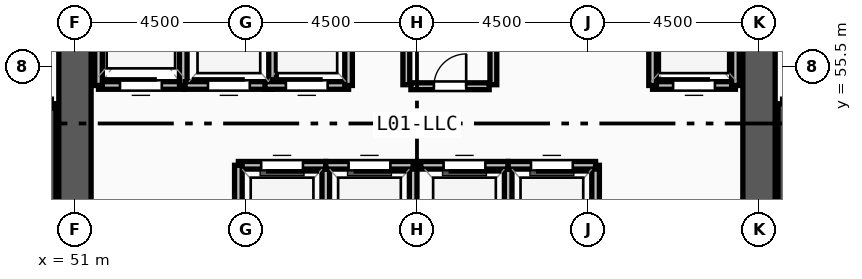
"""IFC4 building model, lengths in metres.
Left out: names, types, materials, properties, quantities, classifications, styles, units other than length and angle.
Written with IfcOpenShell. Run it as: python <this file> out.ifc"""

import sys

from ifc_helpers import new_model, si_unit, direction, frame, frame_2d, origin, place, context, subcontext, project, spatial, rectangle, extrude, source, transform, mapped, element, fill, save


model = new_model("IFC4")
c1 = context("Model", 3, precision=1e-05, world=origin(), true_north=direction((0.0, 1.0)))
c2 = subcontext(c1, "Body", "Model", "MODEL_VIEW")
j1 = project(units=[si_unit("LENGTHUNIT", "METRE"), si_unit("PLANEANGLEUNIT", "RADIAN")], contexts=[c1])
p1 = place(None, origin())
s1 = spatial("IfcSite", under=j1, at=p1, CompositionType="ELEMENT")
p2 = place(p1, origin())
s2 = spatial("IfcBuilding", under=s1, at=p2, CompositionType="ELEMENT")
p3 = place(p2, origin())
s3 = spatial("IfcBuildingStorey", under=s2, at=p3, CompositionType="ELEMENT", Elevation=0.0)
p4 = place(p3, frame((69.0, 60.6, 0.0), z_axis=(0.0, 0.0, 1.0), x_axis=(0.0, -1.0, 0.0)))
e1 = element("IfcWall", 1, at=p4, inside=s3, PredefinedType="SHEAR", context=c2, shape_type="SweptSolid", body=[
    extrude(rectangle(XDim=13.2, YDim=0.85, at=frame_2d((6.6, 0.0))), origin(), (0.0, 0.0, 1.0), 5.15),
])
m1 = source(origin(), c2, "Body", "SweptSolid", [
    extrude(rectangle(XDim=1.2, YDim=2.2, at=frame_2d((0.6, 1.1))), frame((0.0, 0.435, 0.0), z_axis=(0.0, -1.0, 0.0), x_axis=(1.0, 0.0, 0.0)), (0.0, 0.0, 1.0), 0.87),
])
p5 = place(p4, frame((1.05, 0.0, 0.0)))
e2 = element("IfcOpeningElement", 2, at=p5, cuts=e1, PredefinedType="OPENING", context=c2, shape_type="MappedRepresentation", body=[
    mapped(m1, transform((0.0, 0.0, 0.0), x_axis=(1.0, 0.0, 0.0), y_axis=(0.0, 1.0, 0.0), z_axis=(0.0, 0.0, 1.0), scale=1.0)),
])
p6 = place(p3, frame((51.0, 47.4, 0.0), z_axis=(0.0, 0.0, 1.0), x_axis=(0.0, 1.0, 0.0)))
e3 = element("IfcWall", 3, at=p6, inside=s3, PredefinedType="SHEAR", context=c2, shape_type="SweptSolid", body=[
    extrude(rectangle(XDim=13.2, YDim=0.85, at=frame_2d((6.6, 0.0))), origin(), (0.0, 0.0, 1.0), 5.15),
])
m2 = source(origin(), c2, "Body", "SweptSolid", [
    extrude(rectangle(XDim=1.1, YDim=2.2, at=frame_2d((0.55, 1.1))), frame((0.0, 0.435, 0.0), z_axis=(0.0, -1.0, 0.0), x_axis=(1.0, 0.0, 0.0)), (0.0, 0.0, 1.0), 0.87),
])
p7 = place(p6, frame((11.5, 0.0, 0.0)))
e4 = element("IfcOpeningElement", 4, at=p7, cuts=e3, PredefinedType="OPENING", context=c2, shape_type="MappedRepresentation", body=[
    mapped(m2, transform((0.0, 0.0, 0.0), x_axis=(1.0, 0.0, 0.0), y_axis=(0.0, 1.0, 0.0), z_axis=(0.0, 0.0, 1.0), scale=1.0)),
])
for number, where, z_axis, x_axis in (
    (5, (50.38, 46.7, 0.0), (0.0, 0.0, 1.0), (0.0, 1.0, 0.0)),
    (6, (69.62, 54.52, 0.0), (0.0, 0.0, 1.0), (0.0, -1.0, 0.0)),
):
    element("IfcWall", number, at=place(p3, frame(where, z_axis=z_axis, x_axis=x_axis)), inside=s3, PredefinedType="SOLIDWALL", context=c2, shape_type="SweptSolid", body=[
        extrude(rectangle(XDim=7.82, YDim=0.24, at=frame_2d((3.91, 0.0))), origin(), (0.0, 0.0, 1.0), 5.15),
    ])
p8 = place(p3, frame((51.62, 55.0, 0.0), z_axis=(0.0, 0.0, 1.0), x_axis=(1.0, 0.0, 0.0)))
e7 = element("IfcWall", 7, at=p8, inside=s3, PredefinedType="SOLIDWALL", context=c2, shape_type="SweptSolid", body=[
    extrude(rectangle(XDim=2.23, YDim=0.2, at=frame_2d((1.115, 0.0))), origin(), (0.0, 0.0, 1.0), 5.15),
])
m3 = source(origin(), c2, "Body", "SweptSolid", [
    extrude(rectangle(XDim=1.1, YDim=2.2, at=frame_2d((0.55, 1.1))), frame((0.0, 0.11, 0.0), z_axis=(0.0, -1.0, 0.0), x_axis=(1.0, 0.0, 0.0)), (0.0, 0.0, 1.0), 0.22),
])
p9 = place(p8, frame((0.565, 0.0, 0.0)))
e8 = element("IfcOpeningElement", 8, at=p9, cuts=e7, PredefinedType="OPENING", context=c2, shape_type="MappedRepresentation", body=[
    mapped(m3, transform((0.0, 0.0, 0.0), x_axis=(1.0, 0.0, 0.0), y_axis=(0.0, 1.0, 0.0), z_axis=(0.0, 0.0, 1.0), scale=1.0)),
])
for number, where, z_axis, x_axis in (
    (9, (53.85, 55.0, 0.0), (0.0, 0.0, 1.0), (0.0, 1.0, 0.0)),
    (10, (51.62, 58.0, 0.0), (0.0, 0.0, 1.0), (0.0, -1.0, 0.0)),
):
    element("IfcWall", number, at=place(p3, frame(where, z_axis=z_axis, x_axis=x_axis)), inside=s3, PredefinedType="SOLIDWALL", context=c2, shape_type="SweptSolid", body=[
        extrude(rectangle(XDim=3.0, YDim=0.2, at=frame_2d((1.5, 0.0))), origin(), (0.0, 0.0, 1.0), 5.15),
    ])
p10 = place(p3, frame((66.2, 55.0, 0.0), z_axis=(0.0, 0.0, 1.0), x_axis=(1.0, 0.0, 0.0)))
e11 = element("IfcWall", 11, at=p10, inside=s3, PredefinedType="SOLIDWALL", context=c2, shape_type="SweptSolid", body=[
    extrude(rectangle(XDim=2.18, YDim=0.2, at=frame_2d((1.09, 0.0))), origin(), (0.0, 0.0, 1.0), 5.15),
])
p11 = place(p10, frame((0.54, 0.0, 0.0)))
e12 = element("IfcOpeningElement", 12, at=p11, cuts=e11, PredefinedType="OPENING", context=c2, shape_type="MappedRepresentation", body=[
    mapped(m3, transform((0.0, 0.0, 0.0), x_axis=(1.0, 0.0, 0.0), y_axis=(0.0, 1.0, 0.0), z_axis=(0.0, 0.0, 1.0), scale=1.0)),
])
for number, where, z_axis, x_axis in (
    (13, (68.38, 55.0, 0.0), (0.0, 0.0, 1.0), (0.0, 1.0, 0.0)),
    (14, (66.2, 57.75, 0.0), (0.0, 0.0, 1.0), (0.0, -1.0, 0.0)),
):
    element("IfcWall", number, at=place(p3, frame(where, z_axis=z_axis, x_axis=x_axis)), inside=s3, PredefinedType="SOLIDWALL", context=c2, shape_type="SweptSolid", body=[
        extrude(rectangle(XDim=2.75, YDim=0.2, at=frame_2d((1.375, 0.0))), origin(), (0.0, 0.0, 1.0), 5.15),
    ])
p12 = place(p3, frame((57.6, 50.3, 0.0), z_axis=(0.0, 0.0, 1.0), x_axis=(0.0, 1.0, 0.0)))
e15 = element("IfcWall", 15, at=p12, inside=s3, PredefinedType="SOLIDWALL", context=c2, shape_type="SweptSolid", body=[
    extrude(rectangle(XDim=2.6, YDim=0.2, at=frame_2d((1.3, 0.0))), origin(), (0.0, 0.0, 1.0), 5.15),
])
p13 = place(p3, frame((57.6, 52.9, 0.0), z_axis=(0.0, 0.0, 1.0), x_axis=(-1.0, 0.0, 0.0)))
e16 = element("IfcWall", 16, at=p13, inside=s3, PredefinedType="SOLIDWALL", context=c2, shape_type="SweptSolid", body=[
    extrude(rectangle(XDim=2.3, YDim=0.2, at=frame_2d((1.15, 0.0))), origin(), (0.0, 0.0, 1.0), 5.15),
])
p14 = place(p13, frame((0.6, 0.0, 0.0)))
e17 = element("IfcOpeningElement", 17, at=p14, cuts=e16, PredefinedType="OPENING", context=c2, shape_type="MappedRepresentation", body=[
    mapped(m3, transform((0.0, 0.0, 0.0), x_axis=(1.0, 0.0, 0.0), y_axis=(0.0, 1.0, 0.0), z_axis=(0.0, 0.0, 1.0), scale=1.0)),
])
for number, where, z_axis, x_axis in (
    (18, (55.3, 52.9, 0.0), (0.0, 0.0, 1.0), (0.0, -1.0, 0.0)),
    (19, (59.9, 50.3, 0.0), (0.0, 0.0, 1.0), (0.0, 1.0, 0.0)),
):
    element("IfcWall", number, at=place(p3, frame(where, z_axis=z_axis, x_axis=x_axis)), inside=s3, PredefinedType="SOLIDWALL", context=c2, shape_type="SweptSolid", body=[
        extrude(rectangle(XDim=2.6, YDim=0.2, at=frame_2d((1.3, 0.0))), origin(), (0.0, 0.0, 1.0), 5.15),
    ])
p15 = place(p3, frame((59.9, 52.9, 0.0), z_axis=(0.0, 0.0, 1.0), x_axis=(-1.0, 0.0, 0.0)))
e20 = element("IfcWall", 20, at=p15, inside=s3, PredefinedType="SOLIDWALL", context=c2, shape_type="SweptSolid", body=[
    extrude(rectangle(XDim=2.3, YDim=0.2, at=frame_2d((1.15, 0.0))), origin(), (0.0, 0.0, 1.0), 5.15),
])
p16 = place(p15, frame((0.6, 0.0, 0.0)))
e21 = element("IfcOpeningElement", 21, at=p16, cuts=e20, PredefinedType="OPENING", context=c2, shape_type="MappedRepresentation", body=[
    mapped(m3, transform((0.0, 0.0, 0.0), x_axis=(1.0, 0.0, 0.0), y_axis=(0.0, 1.0, 0.0), z_axis=(0.0, 0.0, 1.0), scale=1.0)),
])
p17 = place(p3, frame((62.4, 50.3, 0.0), z_axis=(0.0, 0.0, 1.0), x_axis=(0.0, 1.0, 0.0)))
e22 = element("IfcWall", 22, at=p17, inside=s3, PredefinedType="SOLIDWALL", context=c2, shape_type="SweptSolid", body=[
    extrude(rectangle(XDim=2.6, YDim=0.2, at=frame_2d((1.3, 0.0))), origin(), (0.0, 0.0, 1.0), 5.15),
])
p18 = place(p3, frame((62.4, 52.9, 0.0), z_axis=(0.0, 0.0, 1.0), x_axis=(-1.0, 0.0, 0.0)))
e23 = element("IfcWall", 23, at=p18, inside=s3, PredefinedType="SOLIDWALL", context=c2, shape_type="SweptSolid", body=[
    extrude(rectangle(XDim=2.3, YDim=0.2, at=frame_2d((1.15, 0.0))), origin(), (0.0, 0.0, 1.0), 5.15),
])
p19 = place(p18, frame((0.6, 0.0, 0.0)))
e24 = element("IfcOpeningElement", 24, at=p19, cuts=e23, PredefinedType="OPENING", context=c2, shape_type="MappedRepresentation", body=[
    mapped(m3, transform((0.0, 0.0, 0.0), x_axis=(1.0, 0.0, 0.0), y_axis=(0.0, 1.0, 0.0), z_axis=(0.0, 0.0, 1.0), scale=1.0)),
])
p20 = place(p3, frame((64.7, 50.3, 0.0), z_axis=(0.0, 0.0, 1.0), x_axis=(0.0, 1.0, 0.0)))
e25 = element("IfcWall", 25, at=p20, inside=s3, PredefinedType="SOLIDWALL", context=c2, shape_type="SweptSolid", body=[
    extrude(rectangle(XDim=2.6, YDim=0.2, at=frame_2d((1.3, 0.0))), origin(), (0.0, 0.0, 1.0), 5.15),
])
p21 = place(p3, frame((64.7, 52.9, 0.0), z_axis=(0.0, 0.0, 1.0), x_axis=(-1.0, 0.0, 0.0)))
e26 = element("IfcWall", 26, at=p21, inside=s3, PredefinedType="SOLIDWALL", context=c2, shape_type="SweptSolid", body=[
    extrude(rectangle(XDim=2.3, YDim=0.2, at=frame_2d((1.15, 0.0))), origin(), (0.0, 0.0, 1.0), 5.15),
])
p22 = place(p21, frame((0.6, 0.0, 0.0)))
e27 = element("IfcOpeningElement", 27, at=p22, cuts=e26, PredefinedType="OPENING", context=c2, shape_type="MappedRepresentation", body=[
    mapped(m3, transform((0.0, 0.0, 0.0), x_axis=(1.0, 0.0, 0.0), y_axis=(0.0, 1.0, 0.0), z_axis=(0.0, 0.0, 1.0), scale=1.0)),
])
p23 = place(p3, frame((53.9, 55.0, 0.0), z_axis=(0.0, 0.0, 1.0), x_axis=(1.0, 0.0, 0.0)))
e28 = element("IfcWall", 28, at=p23, inside=s3, PredefinedType="SOLIDWALL", context=c2, shape_type="SweptSolid", body=[
    extrude(rectangle(XDim=2.3, YDim=0.2, at=frame_2d((1.15, 0.0))), origin(), (0.0, 0.0, 1.0), 5.15),
])
p24 = place(p23, frame((0.6, 0.0, 0.0)))
e29 = element("IfcOpeningElement", 29, at=p24, cuts=e28, PredefinedType="OPENING", context=c2, shape_type="MappedRepresentation", body=[
    mapped(m3, transform((0.0, 0.0, 0.0), x_axis=(1.0, 0.0, 0.0), y_axis=(0.0, 1.0, 0.0), z_axis=(0.0, 0.0, 1.0), scale=1.0)),
])
p25 = place(p3, frame((56.2, 55.0, 0.0), z_axis=(0.0, 0.0, 1.0), x_axis=(0.0, 1.0, 0.0)))
e30 = element("IfcWall", 30, at=p25, inside=s3, PredefinedType="SOLIDWALL", context=c2, shape_type="SweptSolid", body=[
    extrude(rectangle(XDim=2.6, YDim=0.2, at=frame_2d((1.3, 0.0))), origin(), (0.0, 0.0, 1.0), 5.15),
])
p26 = place(p3, frame((56.0, 55.0, 0.0), z_axis=(0.0, 0.0, 1.0), x_axis=(1.0, 0.0, 0.0)))
e31 = element("IfcWall", 31, at=p26, inside=s3, PredefinedType="SOLIDWALL", context=c2, shape_type="SweptSolid", body=[
    extrude(rectangle(XDim=2.2, YDim=0.2, at=frame_2d((1.1, 0.0))), origin(), (0.0, 0.0, 1.0), 5.15),
])
p27 = place(p26, frame((0.55, 0.0, 0.0)))
e32 = element("IfcOpeningElement", 32, at=p27, cuts=e31, PredefinedType="OPENING", context=c2, shape_type="MappedRepresentation", body=[
    mapped(m3, transform((0.0, 0.0, 0.0), x_axis=(1.0, 0.0, 0.0), y_axis=(0.0, 1.0, 0.0), z_axis=(0.0, 0.0, 1.0), scale=1.0)),
])
p28 = place(p3, frame((58.2, 55.0, 0.0), z_axis=(0.0, 0.0, 1.0), x_axis=(0.0, 1.0, 0.0)))
e33 = element("IfcWall", 33, at=p28, inside=s3, PredefinedType="SOLIDWALL", context=c2, shape_type="SweptSolid", body=[
    extrude(rectangle(XDim=2.6, YDim=0.2, at=frame_2d((1.3, 0.0))), origin(), (0.0, 0.0, 1.0), 5.15),
])
p29 = place(p3, frame((59.84, 54.98, 0.0), z_axis=(0.0, 0.0, 1.0), x_axis=(1.0, 0.0, 0.0)))
e34 = element("IfcWall", 34, at=p29, inside=s3, PredefinedType="PARTITIONING", context=c2, shape_type="SweptSolid", body=[
    extrude(rectangle(XDim=2.06, YDim=0.18, at=frame_2d((1.03, 0.0))), origin(), (0.0, 0.0, 1.0), 5.15),
])
m4 = source(origin(), c2, "Body", "SweptSolid", [
    extrude(rectangle(XDim=0.85, YDim=2.1, at=frame_2d((0.425, 1.05))), frame((0.0, 0.1, 0.0), z_axis=(0.0, -1.0, 0.0), x_axis=(1.0, 0.0, 0.0)), (0.0, 0.0, 1.0), 0.2),
])
p30 = place(p29, frame((0.605, 0.0, 0.0)))
e35 = element("IfcOpeningElement", 35, at=p30, cuts=e34, PredefinedType="OPENING", context=c2, shape_type="MappedRepresentation", body=[
    mapped(m4, transform((0.0, 0.0, 0.0), x_axis=(1.0, 0.0, 0.0), y_axis=(0.0, 1.0, 0.0), z_axis=(0.0, 0.0, 1.0), scale=1.0)),
])
for number, where, z_axis, x_axis in (
    (36, (59.72, 55.02, 0.0), (0.0, 0.0, 1.0), (0.0, 1.0, 0.0)),
    (37, (62.01, 55.02, 0.0), (0.0, 0.0, 1.0), (0.0, 1.0, 0.0)),
):
    element("IfcWall", number, at=place(p3, frame(where, z_axis=z_axis, x_axis=x_axis)), inside=s3, PredefinedType="PARTITIONING", context=c2, shape_type="SweptSolid", body=[
        extrude(rectangle(XDim=2.88, YDim=0.18, at=frame_2d((1.44, 0.0))), origin(), (0.0, 0.0, 1.0), 5.15),
    ])
m5 = source(origin(), c2, "Body", "SweptSolid", [
    extrude(rectangle(XDim=1.1, YDim=2.2, at=frame_2d((0.55, 1.1))), frame((0.0, 0.025, 0.0), z_axis=(0.0, -1.0, 0.0), x_axis=(1.0, 0.0, 0.0)), (0.0, 0.0, 1.0), 0.05),
])
p31 = place(p9, origin())
e38 = element("IfcDoor", 38, at=p31, inside=s3, OperationType="SLIDING_TO_LEFT", PredefinedType="DOOR", context=c2, shape_type="MappedRepresentation", body=[
    mapped(m5, transform((0.0, 0.0, 0.0), x_axis=(1.0, 0.0, 0.0), y_axis=(0.0, 1.0, 0.0), z_axis=(0.0, 0.0, 1.0), scale=1.0)),
])
fill(e8, e38)
p32 = place(p11, origin())
e39 = element("IfcDoor", 39, at=p32, inside=s3, OperationType="SLIDING_TO_LEFT", PredefinedType="DOOR", context=c2, shape_type="MappedRepresentation", body=[
    mapped(m5, transform((0.0, 0.0, 0.0), x_axis=(1.0, 0.0, 0.0), y_axis=(0.0, 1.0, 0.0), z_axis=(0.0, 0.0, 1.0), scale=1.0)),
])
fill(e12, e39)
p33 = place(p14, origin())
e40 = element("IfcDoor", 40, at=p33, inside=s3, OperationType="SLIDING_TO_LEFT", PredefinedType="DOOR", context=c2, shape_type="MappedRepresentation", body=[
    mapped(m5, transform((0.0, 0.0, 0.0), x_axis=(1.0, 0.0, 0.0), y_axis=(0.0, 1.0, 0.0), z_axis=(0.0, 0.0, 1.0), scale=1.0)),
])
fill(e17, e40)
p34 = place(p16, origin())
e41 = element("IfcDoor", 41, at=p34, inside=s3, OperationType="SLIDING_TO_LEFT", PredefinedType="DOOR", context=c2, shape_type="MappedRepresentation", body=[
    mapped(m5, transform((0.0, 0.0, 0.0), x_axis=(1.0, 0.0, 0.0), y_axis=(0.0, 1.0, 0.0), z_axis=(0.0, 0.0, 1.0), scale=1.0)),
])
fill(e21, e41)
p35 = place(p19, origin())
e42 = element("IfcDoor", 42, at=p35, inside=s3, OperationType="SLIDING_TO_LEFT", PredefinedType="DOOR", context=c2, shape_type="MappedRepresentation", body=[
    mapped(m5, transform((0.0, 0.0, 0.0), x_axis=(1.0, 0.0, 0.0), y_axis=(0.0, 1.0, 0.0), z_axis=(0.0, 0.0, 1.0), scale=1.0)),
])
fill(e24, e42)
p36 = place(p22, origin())
e43 = element("IfcDoor", 43, at=p36, inside=s3, OperationType="SLIDING_TO_LEFT", PredefinedType="DOOR", context=c2, shape_type="MappedRepresentation", body=[
    mapped(m5, transform((0.0, 0.0, 0.0), x_axis=(1.0, 0.0, 0.0), y_axis=(0.0, 1.0, 0.0), z_axis=(0.0, 0.0, 1.0), scale=1.0)),
])
fill(e27, e43)
p37 = place(p24, origin())
e44 = element("IfcDoor", 44, at=p37, inside=s3, OperationType="SLIDING_TO_LEFT", PredefinedType="DOOR", context=c2, shape_type="MappedRepresentation", body=[
    mapped(m5, transform((0.0, 0.0, 0.0), x_axis=(1.0, 0.0, 0.0), y_axis=(0.0, 1.0, 0.0), z_axis=(0.0, 0.0, 1.0), scale=1.0)),
])
fill(e29, e44)
p38 = place(p27, origin())
e45 = element("IfcDoor", 45, at=p38, inside=s3, OperationType="SLIDING_TO_LEFT", PredefinedType="DOOR", context=c2, shape_type="MappedRepresentation", body=[
    mapped(m5, transform((0.0, 0.0, 0.0), x_axis=(1.0, 0.0, 0.0), y_axis=(0.0, 1.0, 0.0), z_axis=(0.0, 0.0, 1.0), scale=1.0)),
])
fill(e32, e45)
m6 = source(origin(), c2, "Body", "SweptSolid", [
    extrude(rectangle(XDim=0.85, YDim=2.1, at=frame_2d((0.425, 1.05))), frame((0.0, 0.025, 0.0), z_axis=(0.0, -1.0, 0.0), x_axis=(1.0, 0.0, 0.0)), (0.0, 0.0, 1.0), 0.05),
])
p39 = place(p30, origin())
e46 = element("IfcDoor", 46, at=p39, inside=s3, OperationType="SINGLE_SWING_RIGHT", PredefinedType="DOOR", context=c2, shape_type="MappedRepresentation", body=[
    mapped(m6, transform((0.0, 0.0, 0.0), x_axis=(1.0, 0.0, 0.0), y_axis=(0.0, 1.0, 0.0), z_axis=(0.0, 0.0, 1.0), scale=1.0)),
])
fill(e35, e46)
save(model, sys.argv[1])
